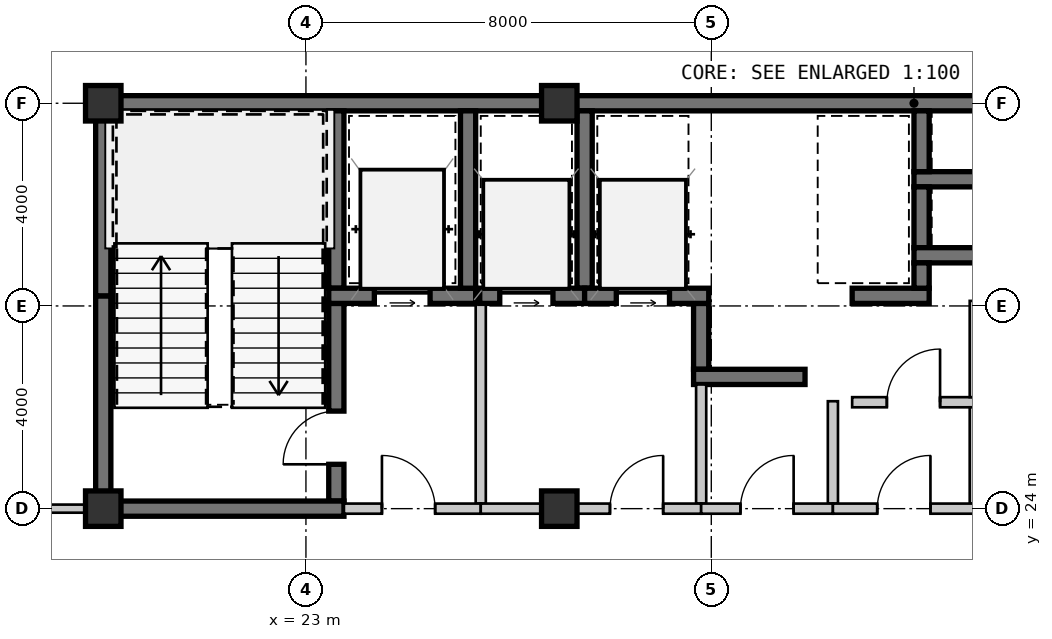
"""IFC4 building model, lengths in metres.
Left out: names, types, materials, properties, quantities, classifications, styles, units other than length and angle.
Written with IfcOpenShell. Run it as: python <this file> out.ifc"""

import sys

from ifc_helpers import new_model, si_unit, direction, frame, frame_2d, origin, origin_2d, place, context, subcontext, project, spatial, rectangle, extrude, source, transform, mapped, element, fill, save


model = new_model("IFC4")
c1 = context("Model", 3, precision=1e-05, world=origin(), true_north=direction((0.0, 1.0)))
c2 = subcontext(c1, "Body", "Model", "MODEL_VIEW")
j1 = project(units=[si_unit("LENGTHUNIT", "METRE"), si_unit("PLANEANGLEUNIT", "RADIAN")], contexts=[c1])
p1 = place(None, origin())
s1 = spatial("IfcSite", under=j1, at=p1, CompositionType="ELEMENT")
p2 = place(p1, origin())
s2 = spatial("IfcBuilding", under=s1, at=p2, CompositionType="ELEMENT")
p3 = place(p2, frame((0.0, 0.0, 65.1)))
s3 = spatial("IfcBuildingStorey", under=s2, at=p3, CompositionType="ELEMENT", Elevation=65.1)
m1 = source(origin(), c2, "Body", "SweptSolid", [
    extrude(rectangle(XDim=0.7, YDim=0.7, at=origin_2d()), origin(), (0.0, 0.0, 1.0), 3.15),
])
for number, where, z_axis, x_axis in (
    (1, (19.0, 24.0, 0.0), (0.0, 0.0, 1.0), (1.0, 0.0, 0.0)),
    (2, (28.0, 24.0, 0.0), (0.0, 0.0, 1.0), (1.0, 0.0, 0.0)),
    (3, (19.0, 32.0, 0.0), (0.0, 0.0, 1.0), (1.0, 0.0, 0.0)),
    (4, (28.0, 32.0, 0.0), (0.0, 0.0, 1.0), (1.0, 0.0, 0.0)),
):
    element("IfcColumn", number, at=place(p3, frame(where, z_axis=z_axis, x_axis=x_axis)), inside=s3, PredefinedType="COLUMN", context=c2, shape_type="MappedRepresentation", body=[
        mapped(m1, transform((0.0, 0.0, 0.0), scale=1.0)),
    ])
m2 = source(origin(), c2, "Body", "SweptSolid", [
    extrude(rectangle(XDim=9.15, YDim=0.3, at=frame_2d((4.575, 0.0))), origin(), (0.0, 0.0, 1.0), 2.93),
])
p4 = place(p3, frame((18.85, 32.0, 0.0), z_axis=(0.0, 0.0, 1.0), x_axis=(1.0, 0.0, 0.0)))
e5 = element("IfcWall", 5, at=p4, inside=s3, PredefinedType="SHEAR", context=c2, shape_type="MappedRepresentation", body=[
    mapped(m2, transform((0.0, 0.0, 0.0), scale=1.0)),
])
m3 = source(origin(), c2, "Body", "SweptSolid", [
    extrude(rectangle(XDim=11.2, YDim=0.3, at=frame_2d((5.6, 0.0))), origin(), (0.0, 0.0, 1.0), 2.93),
])
p5 = place(p3, frame((28.0, 32.0, 0.0), z_axis=(0.0, 0.0, 1.0), x_axis=(1.0, 0.0, 0.0)))
e6 = element("IfcWall", 6, at=p5, inside=s3, PredefinedType="SHEAR", context=c2, shape_type="MappedRepresentation", body=[
    mapped(m3, transform((0.0, 0.0, 0.0), scale=1.0)),
])
m4 = source(origin(), c2, "Body", "SweptSolid", [
    extrude(rectangle(XDim=4.05, YDim=0.3, at=frame_2d((2.025, 0.0))), origin(), (0.0, 0.0, 1.0), 2.93),
])
p6 = place(p3, frame((19.0, 24.15, 0.0), z_axis=(0.0, 0.0, 1.0), x_axis=(0.0, 1.0, 0.0)))
e7 = element("IfcWall", 7, at=p6, inside=s3, PredefinedType="SHEAR", context=c2, shape_type="MappedRepresentation", body=[
    mapped(m4, transform((0.0, 0.0, 0.0), scale=1.0)),
])
m5 = source(origin(), c2, "Body", "SweptSolid", [
    extrude(rectangle(XDim=3.65, YDim=0.3, at=frame_2d((1.825, 0.0))), origin(), (0.0, 0.0, 1.0), 2.93),
])
p7 = place(p3, frame((19.0, 28.2, 0.0), z_axis=(0.0, 0.0, 1.0), x_axis=(0.0, 1.0, 0.0)))
e8 = element("IfcWall", 8, at=p7, inside=s3, PredefinedType="SHEAR", context=c2, shape_type="MappedRepresentation", body=[
    mapped(m5, transform((0.0, 0.0, 0.0), scale=1.0)),
])
m6 = source(origin(), c2, "Body", "SweptSolid", [
    extrude(rectangle(XDim=3.5, YDim=0.3, at=frame_2d((1.75, 0.0))), origin(), (0.0, 0.0, 1.0), 2.93),
])
p8 = place(p3, frame((23.6, 28.35, 0.0), z_axis=(0.0, 0.0, 1.0), x_axis=(0.0, 1.0, 0.0)))
e9 = element("IfcWall", 9, at=p8, inside=s3, PredefinedType="SHEAR", context=c2, shape_type="MappedRepresentation", body=[
    mapped(m6, transform((0.0, 0.0, 0.0), scale=1.0)),
])
m7 = source(origin(), c2, "Body", "SweptSolid", [
    extrude(rectangle(XDim=3.9, YDim=0.3, at=frame_2d((1.95, 0.0))), origin(), (0.0, 0.0, 1.0), 2.93),
])
p9 = place(p3, frame((23.6, 24.15, 0.0), z_axis=(0.0, 0.0, 1.0), x_axis=(0.0, 1.0, 0.0)))
e10 = element("IfcWall", 10, at=p9, inside=s3, PredefinedType="SHEAR", context=c2, shape_type="MappedRepresentation", body=[
    mapped(m7, transform((0.0, 0.0, 0.0), scale=1.0)),
])
m8 = source(origin(), c2, "Body", "SweptSolid", [
    extrude(rectangle(XDim=1.05, YDim=2.1, at=frame_2d((0.525, 1.05))), frame((0.0, 0.16, 0.0), z_axis=(0.0, -1.0, 0.0), x_axis=(1.0, 0.0, 0.0)), (0.0, 0.0, 1.0), 0.32),
])
p10 = place(p9, frame((0.725, 0.0, 0.0)))
e11 = element("IfcOpeningElement", 11, at=p10, cuts=e10, PredefinedType="OPENING", context=c2, shape_type="MappedRepresentation", body=[
    mapped(m8, transform((0.0, 0.0, 0.0), scale=1.0)),
])
m9 = source(origin(), c2, "Body", "SweptSolid", [
    extrude(rectangle(XDim=4.9, YDim=0.3, at=frame_2d((2.45, 0.0))), origin(), (0.0, 0.0, 1.0), 2.93),
])
p11 = place(p3, frame((18.85, 24.0, 0.0), z_axis=(0.0, 0.0, 1.0), x_axis=(1.0, 0.0, 0.0)))
e12 = element("IfcWall", 12, at=p11, inside=s3, PredefinedType="SHEAR", context=c2, shape_type="MappedRepresentation", body=[
    mapped(m9, transform((0.0, 0.0, 0.0), scale=1.0)),
])
m10 = source(origin(), c2, "Body", "SweptSolid", [
    extrude(rectangle(XDim=2.9, YDim=0.3, at=frame_2d((1.45, 0.0))), origin(), (0.0, 0.0, 1.0), 2.93),
])
p12 = place(p3, frame((23.45, 28.2, 0.0), z_axis=(0.0, 0.0, 1.0), x_axis=(1.0, 0.0, 0.0)))
e13 = element("IfcWall", 13, at=p12, inside=s3, PredefinedType="SHEAR", context=c2, shape_type="MappedRepresentation", body=[
    mapped(m10, transform((0.0, 0.0, 0.0), scale=1.0)),
])
m11 = source(origin(), c2, "Body", "SweptSolid", [
    extrude(rectangle(XDim=1.1, YDim=2.15, at=frame_2d((0.55, 1.075))), frame((0.0, 0.16, 0.0), z_axis=(0.0, -1.0, 0.0), x_axis=(1.0, 0.0, 0.0)), (0.0, 0.0, 1.0), 0.32),
])
p13 = place(p12, frame((0.9, 0.0, 0.0)))
e14 = element("IfcOpeningElement", 14, at=p13, cuts=e13, PredefinedType="OPENING", context=c2, shape_type="MappedRepresentation", body=[
    mapped(m11, transform((0.0, 0.0, 0.0), scale=1.0)),
])
p14 = place(p3, frame((26.2, 28.35, 0.0), z_axis=(0.0, 0.0, 1.0), x_axis=(0.0, 1.0, 0.0)))
e15 = element("IfcWall", 15, at=p14, inside=s3, PredefinedType="SHEAR", context=c2, shape_type="MappedRepresentation", body=[
    mapped(m6, transform((0.0, 0.0, 0.0), scale=1.0)),
])
m12 = source(origin(), c2, "Body", "SweptSolid", [
    extrude(rectangle(XDim=3.95, YDim=0.2, at=frame_2d((1.975, 0.0))), origin(), (0.0, 0.0, 1.0), 2.93),
])
p15 = place(p3, frame((26.45, 24.1, 0.0), z_axis=(0.0, 0.0, 1.0), x_axis=(0.0, 1.0, 0.0)))
e16 = element("IfcWall", 16, at=p15, inside=s3, PredefinedType="SOLIDWALL", context=c2, shape_type="MappedRepresentation", body=[
    mapped(m12, transform((0.0, 0.0, 0.0), scale=1.0)),
])
m13 = source(origin(), c2, "Body", "SweptSolid", [
    extrude(rectangle(XDim=2.7, YDim=0.2, at=frame_2d((1.35, 0.0))), origin(), (0.0, 0.0, 1.0), 2.47),
])
p16 = place(p3, frame((23.75, 24.0, 0.0), z_axis=(0.0, 0.0, 1.0), x_axis=(1.0, 0.0, 0.0)))
e17 = element("IfcWall", 17, at=p16, inside=s3, PredefinedType="SOLIDWALL", context=c2, shape_type="MappedRepresentation", body=[
    mapped(m13, transform((0.0, 0.0, 0.0), scale=1.0)),
])
m14 = source(origin(), c2, "Body", "SweptSolid", [
    extrude(rectangle(XDim=1.05, YDim=2.1, at=frame_2d((0.525, 1.05))), frame((0.0, 0.11, 0.0), z_axis=(0.0, -1.0, 0.0), x_axis=(1.0, 0.0, 0.0)), (0.0, 0.0, 1.0), 0.22),
])
p17 = place(p16, frame((0.75, 0.0, 0.0)))
e18 = element("IfcOpeningElement", 18, at=p17, cuts=e17, PredefinedType="OPENING", context=c2, shape_type="MappedRepresentation", body=[
    mapped(m14, transform((0.0, 0.0, 0.0), scale=1.0)),
])
m15 = source(origin(), c2, "Body", "SweptSolid", [
    extrude(rectangle(XDim=2.0, YDim=0.3, at=frame_2d((1.0, 0.0))), origin(), (0.0, 0.0, 1.0), 2.93),
])
p18 = place(p3, frame((35.0, 30.5, 0.0), z_axis=(0.0, 0.0, 1.0), x_axis=(1.0, 0.0, 0.0)))
e19 = element("IfcWall", 19, at=p18, inside=s3, PredefinedType="SHEAR", context=c2, shape_type="MappedRepresentation", body=[
    mapped(m15, transform((0.0, 0.0, 0.0), scale=1.0)),
])
m16 = source(origin(), c2, "Body", "SweptSolid", [
    extrude(rectangle(XDim=1.2, YDim=0.3, at=frame_2d((0.6, 0.0))), origin(), (0.0, 0.0, 1.0), 2.93),
])
for number, where, z_axis, x_axis in (
    (20, (35.15, 31.85, 0.0), (0.0, 0.0, 1.0), (0.0, -1.0, 0.0)),
    (21, (35.15, 30.35, 0.0), (0.0, 0.0, 1.0), (0.0, -1.0, 0.0)),
):
    element("IfcWall", number, at=place(p3, frame(where, z_axis=z_axis, x_axis=x_axis)), inside=s3, PredefinedType="SHEAR", context=c2, shape_type="MappedRepresentation", body=[
        mapped(m16, transform((0.0, 0.0, 0.0), scale=1.0)),
    ])
p19 = place(p3, frame((35.0, 29.0, 0.0), z_axis=(0.0, 0.0, 1.0), x_axis=(1.0, 0.0, 0.0)))
e22 = element("IfcWall", 22, at=p19, inside=s3, PredefinedType="SHEAR", context=c2, shape_type="MappedRepresentation", body=[
    mapped(m15, transform((0.0, 0.0, 0.0), scale=1.0)),
])
m17 = source(origin(), c2, "Body", "SweptSolid", [
    extrude(rectangle(XDim=1.3, YDim=0.3, at=frame_2d((0.65, 0.0))), origin(), (0.0, 0.0, 1.0), 2.93),
])
p20 = place(p3, frame((30.8, 28.05, 0.0), z_axis=(0.0, 0.0, 1.0), x_axis=(0.0, -1.0, 0.0)))
e23 = element("IfcWall", 23, at=p20, inside=s3, PredefinedType="SHEAR", context=c2, shape_type="MappedRepresentation", body=[
    mapped(m17, transform((0.0, 0.0, 0.0), scale=1.0)),
])
m18 = source(origin(), c2, "Body", "SweptSolid", [
    extrude(rectangle(XDim=2.2, YDim=0.3, at=frame_2d((1.1, 0.0))), origin(), (0.0, 0.0, 1.0), 2.93),
])
p21 = place(p3, frame((30.65, 26.6, 0.0), z_axis=(0.0, 0.0, 1.0), x_axis=(1.0, 0.0, 0.0)))
e24 = element("IfcWall", 24, at=p21, inside=s3, PredefinedType="SHEAR", context=c2, shape_type="MappedRepresentation", body=[
    mapped(m18, transform((0.0, 0.0, 0.0), scale=1.0)),
])
p22 = place(p3, frame((28.5, 28.35, 0.0), z_axis=(0.0, 0.0, 1.0), x_axis=(0.0, 1.0, 0.0)))
e25 = element("IfcWall", 25, at=p22, inside=s3, PredefinedType="SHEAR", context=c2, shape_type="MappedRepresentation", body=[
    mapped(m6, transform((0.0, 0.0, 0.0), scale=1.0)),
])
m19 = source(origin(), c2, "Body", "SweptSolid", [
    extrude(rectangle(XDim=2.07, YDim=0.3, at=frame_2d((1.035, 0.0))), origin(), (0.0, 0.0, 1.0), 2.93),
])
p23 = place(p3, frame((26.43, 28.2, 0.0), z_axis=(0.0, 0.0, 1.0), x_axis=(1.0, 0.0, 0.0)))
e26 = element("IfcWall", 26, at=p23, inside=s3, PredefinedType="SHEAR", context=c2, shape_type="MappedRepresentation", body=[
    mapped(m19, transform((0.0, 0.0, 0.0), scale=1.0)),
])
m20 = source(origin(), c2, "Body", "SweptSolid", [
    extrude(rectangle(XDim=1.05, YDim=2.15, at=frame_2d((0.525, 1.075))), frame((0.0, 0.16, 0.0), z_axis=(0.0, -1.0, 0.0), x_axis=(1.0, 0.0, 0.0)), (0.0, 0.0, 1.0), 0.32),
])
p24 = place(p23, frame((0.395, 0.0, 0.0)))
e27 = element("IfcOpeningElement", 27, at=p24, cuts=e26, PredefinedType="OPENING", context=c2, shape_type="MappedRepresentation", body=[
    mapped(m20, transform((0.0, 0.0, 0.0), scale=1.0)),
])
m21 = source(origin(), c2, "Body", "SweptSolid", [
    extrude(rectangle(XDim=2.45, YDim=0.3, at=frame_2d((1.225, 0.0))), origin(), (0.0, 0.0, 1.0), 2.93),
])
p25 = place(p3, frame((28.5, 28.2, 0.0), z_axis=(0.0, 0.0, 1.0), x_axis=(1.0, 0.0, 0.0)))
e28 = element("IfcWall", 28, at=p25, inside=s3, PredefinedType="SHEAR", context=c2, shape_type="MappedRepresentation", body=[
    mapped(m21, transform((0.0, 0.0, 0.0), scale=1.0)),
])
p26 = place(p25, frame((0.625, 0.0, 0.0)))
e29 = element("IfcOpeningElement", 29, at=p26, cuts=e28, PredefinedType="OPENING", context=c2, shape_type="MappedRepresentation", body=[
    mapped(m20, transform((0.0, 0.0, 0.0), scale=1.0)),
])
m22 = source(origin(), c2, "Body", "SweptSolid", [
    extrude(rectangle(XDim=2.35, YDim=0.2, at=frame_2d((1.175, 0.0))), origin(), (0.0, 0.0, 1.0), 2.93),
])
p27 = place(p3, frame((30.8, 26.45, 0.0), z_axis=(0.0, 0.0, 1.0), x_axis=(0.0, -1.0, 0.0)))
e30 = element("IfcWall", 30, at=p27, inside=s3, PredefinedType="SOLIDWALL", context=c2, shape_type="MappedRepresentation", body=[
    mapped(m22, transform((0.0, 0.0, 0.0), scale=1.0)),
])
m23 = source(origin(), c2, "Body", "SweptSolid", [
    extrude(rectangle(XDim=4.35, YDim=0.2, at=frame_2d((2.175, 0.0))), origin(), (0.0, 0.0, 1.0), 2.47),
])
p28 = place(p3, frame((30.8, 24.0, 0.0), z_axis=(0.0, 0.0, 1.0), x_axis=(-1.0, 0.0, 0.0)))
e31 = element("IfcWall", 31, at=p28, inside=s3, PredefinedType="SOLIDWALL", context=c2, shape_type="MappedRepresentation", body=[
    mapped(m23, transform((0.0, 0.0, 0.0), scale=1.0)),
])
p29 = place(p28, frame((0.75, 0.0, 0.0)))
e32 = element("IfcOpeningElement", 32, at=p29, cuts=e31, PredefinedType="OPENING", context=c2, shape_type="MappedRepresentation", body=[
    mapped(m14, transform((0.0, 0.0, 0.0), scale=1.0)),
])
m24 = source(origin(), c2, "Body", "SweptSolid", [
    extrude(rectangle(XDim=1.52, YDim=0.3, at=frame_2d((0.76, 0.0))), origin(), (0.0, 0.0, 1.0), 2.93),
])
p30 = place(p3, frame((33.78, 28.2, 0.0), z_axis=(0.0, 0.0, 1.0), x_axis=(1.0, 0.0, 0.0)))
e33 = element("IfcWall", 33, at=p30, inside=s3, PredefinedType="SHEAR", context=c2, shape_type="MappedRepresentation", body=[
    mapped(m24, transform((0.0, 0.0, 0.0), scale=1.0)),
])
m25 = source(origin(), c2, "Body", "SweptSolid", [
    extrude(rectangle(XDim=0.5, YDim=0.3, at=frame_2d((0.25, 0.0))), origin(), (0.0, 0.0, 1.0), 2.93),
])
p31 = place(p3, frame((35.15, 28.35, 0.0), z_axis=(0.0, 0.0, 1.0), x_axis=(0.0, 1.0, 0.0)))
e34 = element("IfcWall", 34, at=p31, inside=s3, PredefinedType="SHEAR", context=c2, shape_type="MappedRepresentation", body=[
    mapped(m25, transform((0.0, 0.0, 0.0), scale=1.0)),
])
m26 = source(origin(), c2, "Body", "SweptSolid", [
    extrude(rectangle(XDim=2.02, YDim=0.2, at=frame_2d((1.01, 0.0))), origin(), (0.0, 0.0, 1.0), 2.93),
])
p32 = place(p3, frame((33.4, 26.12, 0.0), z_axis=(0.0, 0.0, 1.0), x_axis=(0.0, -1.0, 0.0)))
e35 = element("IfcWall", 35, at=p32, inside=s3, PredefinedType="SOLIDWALL", context=c2, shape_type="MappedRepresentation", body=[
    mapped(m26, transform((0.0, 0.0, 0.0), scale=1.0)),
])
m27 = source(origin(), c2, "Body", "SweptSolid", [
    extrude(rectangle(XDim=2.6, YDim=0.2, at=frame_2d((1.3, 0.0))), origin(), (0.0, 0.0, 1.0), 2.47),
])
p33 = place(p3, frame((33.4, 24.0, 0.0), z_axis=(0.0, 0.0, 1.0), x_axis=(-1.0, 0.0, 0.0)))
e36 = element("IfcWall", 36, at=p33, inside=s3, PredefinedType="SOLIDWALL", context=c2, shape_type="MappedRepresentation", body=[
    mapped(m27, transform((0.0, 0.0, 0.0), scale=1.0)),
])
p34 = place(p33, frame((0.775, 0.0, 0.0)))
e37 = element("IfcOpeningElement", 37, at=p34, cuts=e36, PredefinedType="OPENING", context=c2, shape_type="MappedRepresentation", body=[
    mapped(m14, transform((0.0, 0.0, 0.0), scale=1.0)),
])
m28 = source(origin(), c2, "Body", "SweptSolid", [
    extrude(rectangle(XDim=2.42, YDim=0.2, at=frame_2d((1.21, 0.0))), origin(), (0.0, 0.0, 1.0), 2.93),
])
p35 = place(p3, frame((33.78, 26.1, 0.0), z_axis=(0.0, 0.0, 1.0), x_axis=(1.0, 0.0, 0.0)))
e38 = element("IfcWall", 38, at=p35, inside=s3, PredefinedType="SOLIDWALL", context=c2, shape_type="MappedRepresentation", body=[
    mapped(m28, transform((0.0, 0.0, 0.0), scale=1.0)),
])
p36 = place(p35, frame((0.685, 0.0, 0.0)))
e39 = element("IfcOpeningElement", 39, at=p36, cuts=e38, PredefinedType="OPENING", context=c2, shape_type="MappedRepresentation", body=[
    mapped(m14, transform((0.0, 0.0, 0.0), scale=1.0)),
])
m29 = source(origin(), c2, "Body", "SweptSolid", [
    extrude(rectangle(XDim=1.9, YDim=0.2, at=frame_2d((0.95, 0.0))), origin(), (0.0, 0.0, 1.0), 2.93),
])
p37 = place(p3, frame((36.2, 26.0, 0.0), z_axis=(0.0, 0.0, 1.0), x_axis=(0.0, -1.0, 0.0)))
e40 = element("IfcWall", 40, at=p37, inside=s3, PredefinedType="SOLIDWALL", context=c2, shape_type="MappedRepresentation", body=[
    mapped(m29, transform((0.0, 0.0, 0.0), scale=1.0)),
])
m30 = source(origin(), c2, "Body", "SweptSolid", [
    extrude(rectangle(XDim=2.8, YDim=0.2, at=frame_2d((1.4, 0.0))), origin(), (0.0, 0.0, 1.0), 2.47),
])
p38 = place(p3, frame((36.2, 24.0, 0.0), z_axis=(0.0, 0.0, 1.0), x_axis=(-1.0, 0.0, 0.0)))
e41 = element("IfcWall", 41, at=p38, inside=s3, PredefinedType="SOLIDWALL", context=c2, shape_type="MappedRepresentation", body=[
    mapped(m30, transform((0.0, 0.0, 0.0), scale=1.0)),
])
p39 = place(p38, frame((0.875, 0.0, 0.0)))
e42 = element("IfcOpeningElement", 42, at=p39, cuts=e41, PredefinedType="OPENING", context=c2, shape_type="MappedRepresentation", body=[
    mapped(m14, transform((0.0, 0.0, 0.0), scale=1.0)),
])
m31 = source(origin(), c2, "Body", "SweptSolid", [
    extrude(rectangle(XDim=1.9, YDim=0.2, at=frame_2d((0.95, 0.0))), origin(), (0.0, 0.0, 1.0), 2.93),
])
p40 = place(p3, frame((36.2, 28.1, 0.0), z_axis=(0.0, 0.0, 1.0), x_axis=(0.0, -1.0, 0.0)))
e43 = element("IfcWall", 43, at=p40, inside=s3, PredefinedType="SOLIDWALL", context=c2, shape_type="MappedRepresentation", body=[
    mapped(m31, transform((0.0, 0.0, 0.0), scale=1.0)),
])
m32 = source(origin(), c2, "Body", "SweptSolid", [
    extrude(rectangle(XDim=4.17, YDim=0.16, at=frame_2d((2.085, 0.0))), origin(), (0.0, 0.0, 1.0), 2.93),
])
p41 = place(p3, frame((14.68, 24.0, 0.0), z_axis=(0.0, 0.0, 1.0), x_axis=(1.0, 0.0, 0.0)))
e44 = element("IfcWall", 44, at=p41, inside=s3, PredefinedType="PARTITIONING", context=c2, shape_type="MappedRepresentation", body=[
    mapped(m32, transform((0.0, 0.0, 0.0), scale=1.0)),
])
m33 = source(origin(), c2, "Body", "SweptSolid", [
    extrude(rectangle(XDim=0.92, YDim=2.1, at=frame_2d((0.46, 1.05))), frame((0.0, 0.09, 0.0), z_axis=(0.0, -1.0, 0.0), x_axis=(1.0, 0.0, 0.0)), (0.0, 0.0, 1.0), 0.18),
])
p42 = place(p41, frame((1.69, 0.0, 0.0)))
e45 = element("IfcOpeningElement", 45, at=p42, cuts=e44, PredefinedType="OPENING", context=c2, shape_type="MappedRepresentation", body=[
    mapped(m33, transform((0.0, 0.0, 0.0), scale=1.0)),
])
m34 = source(origin(), c2, "Body", "SweptSolid", [
    extrude(rectangle(XDim=1.05, YDim=2.1, at=frame_2d((0.525, 1.05))), frame((0.0, 0.025, 0.0), z_axis=(0.0, -1.0, 0.0), x_axis=(1.0, 0.0, 0.0)), (0.0, 0.0, 1.0), 0.05),
])
p43 = place(p10, origin())
e46 = element("IfcDoor", 46, at=p43, inside=s3, OperationType="SINGLE_SWING_LEFT", PredefinedType="DOOR", context=c2, shape_type="MappedRepresentation", body=[
    mapped(m34, transform((0.0, 0.0, 0.0), scale=1.0)),
])
fill(e11, e46)
m35 = source(origin(), c2, "Body", "SweptSolid", [
    extrude(rectangle(XDim=1.1, YDim=2.15, at=frame_2d((0.55, 1.075))), frame((0.0, 0.025, 0.0), z_axis=(0.0, -1.0, 0.0), x_axis=(1.0, 0.0, 0.0)), (0.0, 0.0, 1.0), 0.05),
])
p44 = place(p13, origin())
e47 = element("IfcDoor", 47, at=p44, inside=s3, OperationType="SLIDING_TO_LEFT", PredefinedType="DOOR", context=c2, shape_type="MappedRepresentation", body=[
    mapped(m35, transform((0.0, 0.0, 0.0), scale=1.0)),
])
fill(e14, e47)
p45 = place(p17, origin())
e48 = element("IfcDoor", 48, at=p45, inside=s3, OperationType="SINGLE_SWING_LEFT", PredefinedType="DOOR", context=c2, shape_type="MappedRepresentation", body=[
    mapped(m34, transform((0.0, 0.0, 0.0), scale=1.0)),
])
fill(e18, e48)
m36 = source(origin(), c2, "Body", "SweptSolid", [
    extrude(rectangle(XDim=1.05, YDim=2.15, at=frame_2d((0.525, 1.075))), frame((0.0, 0.025, 0.0), z_axis=(0.0, -1.0, 0.0), x_axis=(1.0, 0.0, 0.0)), (0.0, 0.0, 1.0), 0.05),
])
p46 = place(p24, origin())
e49 = element("IfcDoor", 49, at=p46, inside=s3, OperationType="SLIDING_TO_LEFT", PredefinedType="DOOR", context=c2, shape_type="MappedRepresentation", body=[
    mapped(m36, transform((0.0, 0.0, 0.0), scale=1.0)),
])
fill(e27, e49)
p47 = place(p26, origin())
e50 = element("IfcDoor", 50, at=p47, inside=s3, OperationType="SLIDING_TO_LEFT", PredefinedType="DOOR", context=c2, shape_type="MappedRepresentation", body=[
    mapped(m36, transform((0.0, 0.0, 0.0), scale=1.0)),
])
fill(e29, e50)
p48 = place(p29, frame((1.05, 0.0, 0.0), z_axis=(0.0, 0.0, 1.0), x_axis=(-1.0, 0.0, 0.0)))
e51 = element("IfcDoor", 51, at=p48, inside=s3, OperationType="SINGLE_SWING_RIGHT", PredefinedType="DOOR", context=c2, shape_type="MappedRepresentation", body=[
    mapped(m34, transform((0.0, 0.0, 0.0), scale=1.0)),
])
fill(e32, e51)
p49 = place(p34, frame((1.05, 0.0, 0.0), z_axis=(0.0, 0.0, 1.0), x_axis=(-1.0, 0.0, 0.0)))
e52 = element("IfcDoor", 52, at=p49, inside=s3, OperationType="SINGLE_SWING_RIGHT", PredefinedType="DOOR", context=c2, shape_type="MappedRepresentation", body=[
    mapped(m34, transform((0.0, 0.0, 0.0), scale=1.0)),
])
fill(e37, e52)
p50 = place(p36, origin())
e53 = element("IfcDoor", 53, at=p50, inside=s3, OperationType="SINGLE_SWING_RIGHT", PredefinedType="DOOR", context=c2, shape_type="MappedRepresentation", body=[
    mapped(m34, transform((0.0, 0.0, 0.0), scale=1.0)),
])
fill(e39, e53)
p51 = place(p39, frame((1.05, 0.0, 0.0), z_axis=(0.0, 0.0, 1.0), x_axis=(-1.0, 0.0, 0.0)))
e54 = element("IfcDoor", 54, at=p51, inside=s3, OperationType="SINGLE_SWING_RIGHT", PredefinedType="DOOR", context=c2, shape_type="MappedRepresentation", body=[
    mapped(m34, transform((0.0, 0.0, 0.0), scale=1.0)),
])
fill(e42, e54)
save(model, sys.argv[1])
